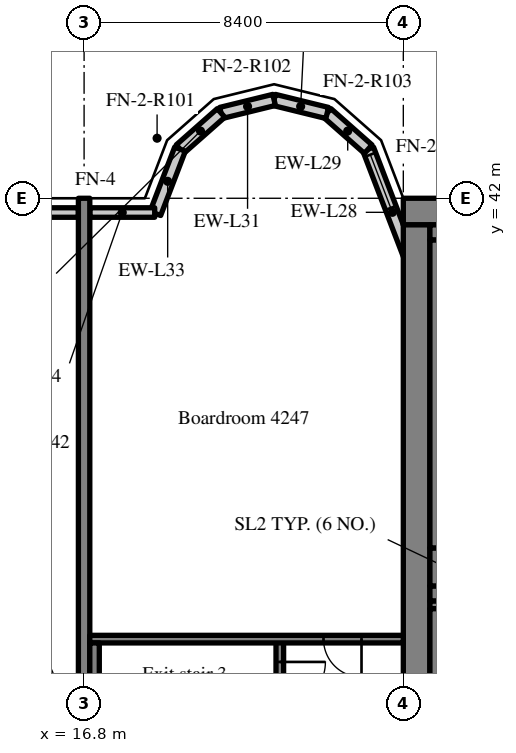
"""IFC4 building model, lengths in metres.
Left out: names, types, materials, properties, quantities, classifications, styles, units other than length and angle.
Written with IfcOpenShell. Run it as: python <this file> out.ifc"""

import sys

from ifc_helpers import new_model, si_unit, direction, frame, frame_2d, origin, place, context, subcontext, project, spatial, rectangle, extrude, source, transform, mapped, element, fill, save


model = new_model("IFC4")
c1 = context("Model", 3, precision=1e-05, world=origin(), true_north=direction((0.0, 1.0)))
c2 = subcontext(c1, "Body", "Model", "MODEL_VIEW")
j1 = project(units=[si_unit("LENGTHUNIT", "METRE"), si_unit("PLANEANGLEUNIT", "RADIAN")], contexts=[c1])
p1 = place(None, origin())
s1 = spatial("IfcSite", under=j1, at=p1, CompositionType="ELEMENT")
p2 = place(p1, origin())
s2 = spatial("IfcBuilding", under=s1, at=p2, CompositionType="ELEMENT")
p3 = place(p2, frame((0.0, 0.0, 174.4)))
s3 = spatial("IfcBuildingStorey", under=s2, at=p3, CompositionType="ELEMENT", Elevation=174.4)
m1 = source(origin(), c2, "Body", "SweptSolid", [
    extrude(rectangle(XDim=50.4, YDim=0.7, at=frame_2d((25.2, 0.0))), origin(), (0.0, 0.0, 1.0), 3.52),
])
p4 = place(p3, frame((25.2, 41.65, 0.0), z_axis=(0.0, 0.0, 1.0), x_axis=(1.0, 0.0, 0.0)))
e1 = element("IfcWall", 1, at=p4, inside=s3, PredefinedType="SHEAR", context=c2, shape_type="MappedRepresentation", body=[
    mapped(m1, transform((0.0, 0.0, 0.0), scale=1.0)),
])
m2 = source(origin(), c2, "Body", "SweptSolid", [
    extrude(rectangle(XDim=18.6, YDim=0.7, at=frame_2d((9.3, 0.0))), origin(), (0.0, 0.0, 1.0), 3.52),
])
p5 = place(p3, frame((25.55, 22.7, 0.0), z_axis=(0.0, 0.0, 1.0), x_axis=(0.0, 1.0, 0.0)))
e2 = element("IfcWall", 2, at=p5, inside=s3, PredefinedType="SHEAR", context=c2, shape_type="MappedRepresentation", body=[
    mapped(m2, transform((0.0, 0.0, 0.0), scale=1.0)),
])
m3 = source(origin(), c2, "Body", "SweptSolid", [
    extrude(rectangle(XDim=7.5, YDim=0.4, at=frame_2d((3.75, 0.0))), origin(), (0.0, 0.0, 1.0), 3.52),
])
p6 = place(p3, frame((25.9, 31.6, 0.0), z_axis=(0.0, 0.0, 1.0), x_axis=(1.0, 0.0, 0.0)))
e3 = element("IfcWall", 3, at=p6, inside=s3, PredefinedType="SHEAR", context=c2, shape_type="MappedRepresentation", body=[
    mapped(m3, transform((0.0, 0.0, 0.0), scale=1.0)),
])
m4 = source(origin(), c2, "Body", "SweptSolid", [
    extrude(rectangle(XDim=1.1, YDim=2.1, at=frame_2d((0.55, 1.05))), frame((0.0, 0.21, 0.0), z_axis=(0.0, -1.0, 0.0), x_axis=(1.0, 0.0, 0.0)), (0.0, 0.0, 1.0), 0.42),
])
p7 = place(p6, frame((5.825, 0.0, 0.0)))
e4 = element("IfcOpeningElement", 4, at=p7, cuts=e3, PredefinedType="OPENING", context=c2, shape_type="MappedRepresentation", body=[
    mapped(m4, transform((0.0, 0.0, 0.0), scale=1.0)),
])
m5 = source(origin(), c2, "Body", "SweptSolid", [
    extrude(rectangle(XDim=20.0, YDim=0.3, at=frame_2d((10.0, 0.0))), origin(), (0.0, 0.0, 1.0), 3.52),
])
p8 = place(p3, frame((16.8, 22.0, 0.0), z_axis=(0.0, 0.0, 1.0), x_axis=(0.0, 1.0, 0.0)))
e5 = element("IfcWall", 5, at=p8, inside=s3, PredefinedType="SHEAR", context=c2, shape_type="MappedRepresentation", body=[
    mapped(m5, transform((0.0, 0.0, 0.0), scale=1.0)),
])
m6 = source(origin(), c2, "Body", "SweptSolid", [
    extrude(rectangle(XDim=3.559, YDim=0.3, at=frame_2d((1.78, 0.0))), origin(), (0.0, 0.0, 1.0), 3.52),
])
p9 = place(p3, frame((25.55, 39.969, 0.0), z_axis=(0.0, 0.0, 1.0), x_axis=(-0.35779745313, 0.933799219604, 0.0)))
e6 = element("IfcWall", 6, at=p9, inside=s3, PredefinedType="SOLIDWALL", context=c2, shape_type="MappedRepresentation", body=[
    mapped(m6, transform((0.0, 0.0, 0.0), scale=1.0)),
])
m7 = source(origin(), c2, "Body", "SweptSolid", [
    extrude(rectangle(XDim=1.5, YDim=2.0, at=frame_2d((0.75, 1.0))), frame((0.0, 0.16, 0.0), z_axis=(0.0, -1.0, 0.0), x_axis=(1.0, 0.0, 0.0)), (0.0, 0.0, 1.0), 0.32),
])
p10 = place(p9, frame((1.903, 0.0, 0.9)))
e7 = element("IfcOpeningElement", 7, at=p10, cuts=e6, PredefinedType="OPENING", context=c2, shape_type="MappedRepresentation", body=[
    mapped(m7, transform((0.0, 0.0, 0.0), scale=1.0)),
])
m8 = source(origin(), c2, "Body", "SweptSolid", [
    extrude(rectangle(XDim=1.44, YDim=0.3, at=frame_2d((0.72, 0.0))), origin(), (0.0, 0.0, 1.0), 3.52),
])
p11 = place(p3, frame((24.277, 43.292, 0.0), z_axis=(0.0, 0.0, 1.0), x_axis=(-0.749649827867, 0.661834673902, 0.0)))
e8 = element("IfcWall", 8, at=p11, inside=s3, PredefinedType="SOLIDWALL", context=c2, shape_type="MappedRepresentation", body=[
    mapped(m8, transform((0.0, 0.0, 0.0), scale=1.0)),
])
m9 = source(origin(), c2, "Body", "SweptSolid", [
    extrude(rectangle(XDim=1.438, YDim=0.3, at=frame_2d((0.719, 0.0))), origin(), (0.0, 0.0, 1.0), 3.52),
])
p12 = place(p3, frame((23.197, 44.245, 0.0), z_axis=(0.0, 0.0, 1.0), x_axis=(-0.971152283879, 0.238460146601, 0.0)))
e9 = element("IfcWall", 9, at=p12, inside=s3, PredefinedType="SOLIDWALL", context=c2, shape_type="MappedRepresentation", body=[
    mapped(m9, transform((0.0, 0.0, 0.0), scale=1.0)),
])
m10 = source(origin(), c2, "Body", "SweptSolid", [
    extrude(rectangle(XDim=1.439, YDim=0.3, at=frame_2d((0.719, 0.0))), origin(), (0.0, 0.0, 1.0), 3.52),
])
p13 = place(p3, frame((21.8, 44.588, 0.0), z_axis=(0.0, 0.0, 1.0), x_axis=(-0.971161932466, -0.238420848351, 0.0)))
e10 = element("IfcWall", 10, at=p13, inside=s3, PredefinedType="SOLIDWALL", context=c2, shape_type="MappedRepresentation", body=[
    mapped(m10, transform((0.0, 0.0, 0.0), scale=1.0)),
])
m11 = source(origin(), c2, "Body", "SweptSolid", [
    extrude(rectangle(XDim=1.44, YDim=0.3, at=frame_2d((0.72, 0.0))), origin(), (0.0, 0.0, 1.0), 3.52),
])
p14 = place(p3, frame((20.403, 44.245, 0.0), z_axis=(0.0, 0.0, 1.0), x_axis=(-0.74957555648, -0.661918790432, 0.0)))
e11 = element("IfcWall", 11, at=p14, inside=s3, PredefinedType="SOLIDWALL", context=c2, shape_type="MappedRepresentation", body=[
    mapped(m11, transform((0.0, 0.0, 0.0), scale=1.0)),
])
m12 = source(origin(), c2, "Body", "SweptSolid", [
    extrude(rectangle(XDim=1.812, YDim=0.3, at=frame_2d((0.906, 0.0))), origin(), (0.0, 0.0, 1.0), 3.52),
])
p15 = place(p3, frame((19.323, 43.292, 0.0), z_axis=(0.0, 0.0, 1.0), x_axis=(-0.357877270961, -0.93376863244, 0.0)))
e12 = element("IfcWall", 12, at=p15, inside=s3, PredefinedType="SOLIDWALL", context=c2, shape_type="MappedRepresentation", body=[
    mapped(m12, transform((0.0, 0.0, 0.0), scale=1.0)),
])
m13 = source(origin(), c2, "Body", "SweptSolid", [
    extrude(rectangle(XDim=4.094, YDim=0.25, at=frame_2d((2.047, 0.0))), origin(), (0.0, 0.0, 1.0), 2.87),
])
p16 = place(p3, frame((16.65, 41.625, 0.0), z_axis=(0.0, 0.0, 1.0), x_axis=(-1.0, 0.0, 0.0)))
e13 = element("IfcWall", 13, at=p16, inside=s3, PredefinedType="SOLIDWALL", context=c2, shape_type="MappedRepresentation", body=[
    mapped(m13, transform((0.0, 0.0, 0.0), scale=1.0)),
])
m14 = source(origin(), c2, "Body", "SweptSolid", [
    extrude(rectangle(XDim=1.5, YDim=1.5, at=frame_2d((0.75, 0.75))), frame((0.0, 0.135, 0.0), z_axis=(0.0, -1.0, 0.0), x_axis=(1.0, 0.0, 0.0)), (0.0, 0.0, 1.0), 0.27),
])
p17 = place(p16, frame((1.297, 0.0, 0.9)))
e14 = element("IfcOpeningElement", 14, at=p17, cuts=e13, PredefinedType="OPENING", context=c2, shape_type="MappedRepresentation", body=[
    mapped(m14, transform((0.0, 0.0, 0.0), scale=1.0)),
])
m15 = source(origin(), c2, "Body", "SweptSolid", [
    extrude(rectangle(XDim=1.708, YDim=0.25, at=frame_2d((0.854, 0.0))), origin(), (0.0, 0.0, 1.0), 2.87),
])
p18 = place(p3, frame((18.658, 41.625, 0.0), z_axis=(0.0, 0.0, 1.0), x_axis=(-1.0, 0.0, 0.0)))
e15 = element("IfcWall", 15, at=p18, inside=s3, PredefinedType="SOLIDWALL", context=c2, shape_type="MappedRepresentation", body=[
    mapped(m15, transform((0.0, 0.0, 0.0), scale=1.0)),
])
m16 = source(origin(), c2, "Body", "SweptSolid", [
    extrude(rectangle(XDim=8.3, YDim=0.2, at=frame_2d((4.15, 0.0))), origin(), (0.0, 0.0, 1.0), 3.52),
])
p19 = place(p3, frame((21.95, 22.1, 0.0), z_axis=(0.0, 0.0, 1.0), x_axis=(0.0, 1.0, 0.0)))
e16 = element("IfcWall", 16, at=p19, inside=s3, PredefinedType="SOLIDWALL", context=c2, shape_type="MappedRepresentation", body=[
    mapped(m16, transform((0.0, 0.0, 0.0), scale=1.0)),
])
m17 = source(origin(), c2, "Body", "SweptSolid", [
    extrude(rectangle(XDim=1.2, YDim=2.1, at=frame_2d((0.6, 1.05))), frame((0.0, 0.11, 0.0), z_axis=(0.0, -1.0, 0.0), x_axis=(1.0, 0.0, 0.0)), (0.0, 0.0, 1.0), 0.22),
])
p20 = place(p19, frame((6.5, 0.0, 0.0)))
e17 = element("IfcOpeningElement", 17, at=p20, cuts=e16, PredefinedType="OPENING", context=c2, shape_type="MappedRepresentation", body=[
    mapped(m17, transform((0.0, 0.0, 0.0), scale=1.0)),
])
m18 = source(origin(), c2, "Body", "SweptSolid", [
    extrude(rectangle(XDim=8.25, YDim=0.2, at=frame_2d((4.125, 0.0))), origin(), (0.0, 0.0, 1.0), 3.52),
])
p21 = place(p3, frame((16.95, 30.4, 0.0), z_axis=(0.0, 0.0, 1.0), x_axis=(1.0, 0.0, 0.0)))
e18 = element("IfcWall", 18, at=p21, inside=s3, PredefinedType="SOLIDWALL", context=c2, shape_type="MappedRepresentation", body=[
    mapped(m18, transform((0.0, 0.0, 0.0), scale=1.0)),
])
m19 = source(origin(), c2, "Body", "SweptSolid", [
    extrude(rectangle(XDim=1.0, YDim=2.1, at=frame_2d((0.5, 1.05))), frame((0.0, 0.11, 0.0), z_axis=(0.0, -1.0, 0.0), x_axis=(1.0, 0.0, 0.0)), (0.0, 0.0, 1.0), 0.22),
])
p22 = place(p21, frame((6.15, 0.0, 0.0)))
e19 = element("IfcOpeningElement", 19, at=p22, cuts=e18, PredefinedType="OPENING", context=c2, shape_type="MappedRepresentation", body=[
    mapped(m19, transform((0.0, 0.0, 0.0), scale=1.0)),
])
m20 = source(origin(), c2, "Body", "SweptSolid", [
    extrude(rectangle(XDim=5.05, YDim=0.2, at=frame_2d((2.525, 0.0))), origin(), (0.0, 0.0, 1.0), 3.52),
])
p23 = place(p3, frame((25.9, 31.3, 0.0), z_axis=(0.0, 0.0, 1.0), x_axis=(1.0, 0.0, 0.0)))
e20 = element("IfcWall", 20, at=p23, inside=s3, PredefinedType="SOLIDWALL", context=c2, shape_type="MappedRepresentation", body=[
    mapped(m20, transform((0.0, 0.0, 0.0), scale=1.0)),
])
m21 = source(origin(), c2, "Body", "SweptSolid", [
    extrude(rectangle(XDim=8.1, YDim=0.4, at=frame_2d((4.05, 0.0))), origin(), (0.0, 0.0, 1.0), 3.52),
])
p24 = place(p3, frame((26.1, 23.1, 0.0), z_axis=(0.0, 0.0, 1.0), x_axis=(0.0, 1.0, 0.0)))
e21 = element("IfcWall", 21, at=p24, inside=s3, PredefinedType="SOLIDWALL", context=c2, shape_type="MappedRepresentation", body=[
    mapped(m21, transform((0.0, 0.0, 0.0), scale=1.0)),
])
m22 = source(origin(), c2, "Body", "SweptSolid", [
    extrude(rectangle(XDim=8.1, YDim=0.25, at=frame_2d((4.05, 0.0))), origin(), (0.0, 0.0, 1.0), 3.52),
])
p25 = place(p3, frame((17.075, 22.2, 0.0), z_axis=(0.0, 0.0, 1.0), x_axis=(0.0, 1.0, 0.0)))
e22 = element("IfcWall", 22, at=p25, inside=s3, PredefinedType="SOLIDWALL", context=c2, shape_type="MappedRepresentation", body=[
    mapped(m22, transform((0.0, 0.0, 0.0), scale=1.0)),
])
m23 = source(origin(), c2, "Body", "SweptSolid", [
    extrude(rectangle(XDim=5.05, YDim=0.4, at=frame_2d((2.525, 0.0))), origin(), (0.0, 0.0, 1.0), 3.52),
])
p26 = place(p3, frame((25.9, 41.1, 0.0), z_axis=(0.0, 0.0, 1.0), x_axis=(1.0, 0.0, 0.0)))
e23 = element("IfcWall", 23, at=p26, inside=s3, PredefinedType="SOLIDWALL", context=c2, shape_type="MappedRepresentation", body=[
    mapped(m23, transform((0.0, 0.0, 0.0), scale=1.0)),
])
m24 = source(origin(), c2, "Body", "SweptSolid", [
    extrude(rectangle(XDim=5.05, YDim=1.0, at=frame_2d((2.525, 0.0))), origin(), (0.0, 0.0, 1.0), 3.52),
])
p27 = place(p3, frame((25.9, 32.3, 0.0), z_axis=(0.0, 0.0, 1.0), x_axis=(1.0, 0.0, 0.0)))
e24 = element("IfcWall", 24, at=p27, inside=s3, PredefinedType="SOLIDWALL", context=c2, shape_type="MappedRepresentation", body=[
    mapped(m24, transform((0.0, 0.0, 0.0), scale=1.0)),
])
p28 = place(p3, frame((26.1, 32.8, 0.0), z_axis=(0.0, 0.0, 1.0), x_axis=(0.0, 1.0, 0.0)))
e25 = element("IfcWall", 25, at=p28, inside=s3, PredefinedType="SOLIDWALL", context=c2, shape_type="MappedRepresentation", body=[
    mapped(m21, transform((0.0, 0.0, 0.0), scale=1.0)),
])
m25 = source(origin(), c2, "Body", "SweptSolid", [
    extrude(rectangle(XDim=1.5, YDim=2.0, at=frame_2d((0.75, 1.0))), frame((0.0, 0.03, 0.0), z_axis=(0.0, -1.0, 0.0), x_axis=(1.0, 0.0, 0.0)), (0.0, 0.0, 1.0), 0.06),
])
p29 = place(p10, origin())
e26 = element("IfcWindow", 26, at=p29, inside=s3, PartitioningType="SINGLE_PANEL", PredefinedType="WINDOW", context=c2, shape_type="MappedRepresentation", body=[
    mapped(m25, transform((0.0, 0.0, 0.0), scale=1.0)),
])
fill(e7, e26)
m26 = source(origin(), c2, "Body", "SweptSolid", [
    extrude(rectangle(XDim=1.2, YDim=2.1, at=frame_2d((0.6, 1.05))), frame((0.0, 0.025, 0.0), z_axis=(0.0, -1.0, 0.0), x_axis=(1.0, 0.0, 0.0)), (0.0, 0.0, 1.0), 0.05),
])
p30 = place(p20, origin())
e27 = element("IfcDoor", 27, at=p30, inside=s3, OperationType="SINGLE_SWING_RIGHT", PredefinedType="DOOR", context=c2, shape_type="MappedRepresentation", body=[
    mapped(m26, transform((0.0, 0.0, 0.0), scale=1.0)),
])
fill(e17, e27)
m27 = source(origin(), c2, "Body", "SweptSolid", [
    extrude(rectangle(XDim=1.0, YDim=2.1, at=frame_2d((0.5, 1.05))), frame((0.0, 0.025, 0.0), z_axis=(0.0, -1.0, 0.0), x_axis=(1.0, 0.0, 0.0)), (0.0, 0.0, 1.0), 0.05),
])
p31 = place(p22, origin())
e28 = element("IfcDoor", 28, at=p31, inside=s3, OperationType="SINGLE_SWING_RIGHT", PredefinedType="DOOR", context=c2, shape_type="MappedRepresentation", body=[
    mapped(m27, transform((0.0, 0.0, 0.0), scale=1.0)),
])
fill(e19, e28)
save(model, sys.argv[1])
